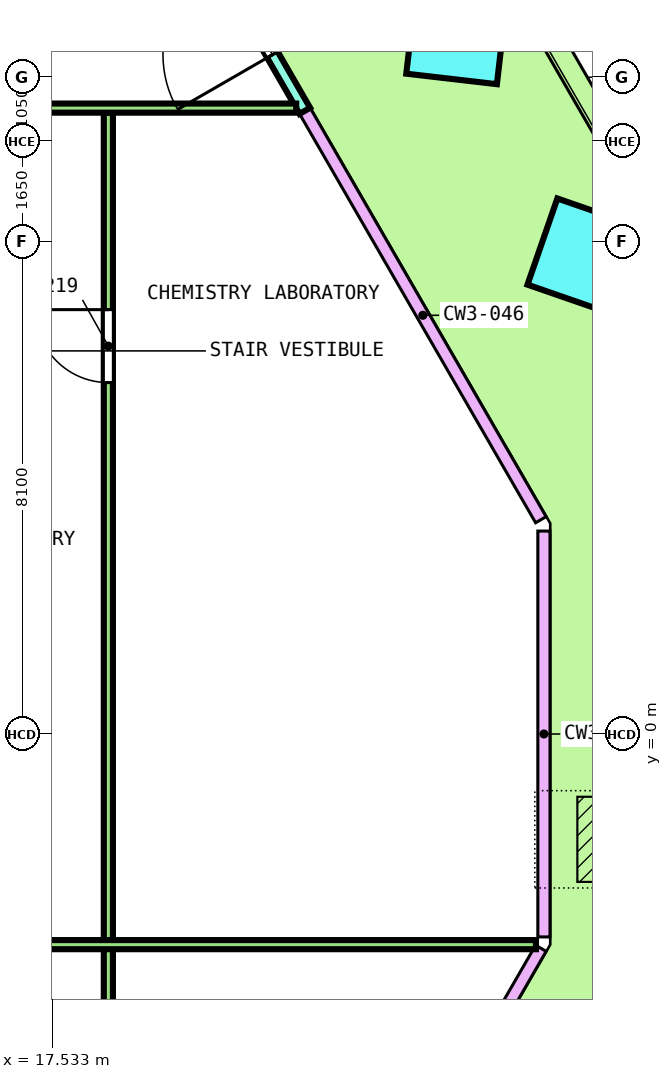
"""IFC4 building model, lengths in metres.
Left out: names, types, materials, properties, quantities, classifications, styles, units other than length and angle.
Written with IfcOpenShell. Run it as: python <this file> out.ifc"""

import sys

from ifc_helpers import new_model, si_unit, direction, frame, frame_2d, origin, origin_2d, place, context, subcontext, project, spatial, rectangle, extrude, element, fill, save


model = new_model("IFC4")
c1 = context("Model", 3, precision=1e-05, world=origin(), true_north=direction((0.0, 1.0)))
c2 = subcontext(c1, "Body", "Model", "MODEL_VIEW")
j1 = project(units=[si_unit("LENGTHUNIT", "METRE"), si_unit("PLANEANGLEUNIT", "RADIAN")], contexts=[c1])
p1 = place(None, origin())
s1 = spatial("IfcSite", under=j1, at=p1, CompositionType="ELEMENT")
p2 = place(p1, origin())
s2 = spatial("IfcBuilding", under=s1, at=p2, CompositionType="ELEMENT")
p3 = place(p2, frame((0.0, 0.0, 14.6)))
s3 = spatial("IfcBuildingStorey", under=s2, at=p3, CompositionType="ELEMENT", Elevation=14.6)
p4 = place(p3, frame((26.297, 7.853, 0.0), z_axis=(0.021750699922, 0.025124769716, 0.999447673968), x_axis=(-0.500115634806, 0.865890237028, -0.010883438912)))
e1 = element("IfcColumn", 1, at=p4, inside=s3, PredefinedType="COLUMN", context=c2, shape_type="SweptSolid", body=[
    extrude(rectangle(XDim=1.5, YDim=1.5, at=origin_2d()), origin(), (0.0, 0.0, 1.0), 4.052),
])
p5 = place(p3, frame((24.181, 11.518, 0.0), z_axis=(0.025367110012, 0.018859632859, 0.999500287133), x_axis=(-0.500321532448, 0.865832038602, -0.003639381657)))
e2 = element("IfcColumn", 2, at=p5, inside=s3, PredefinedType="COLUMN", context=c2, shape_type="SweptSolid", body=[
    extrude(rectangle(XDim=1.5, YDim=1.5, at=origin_2d()), origin(), (0.0, 0.0, 1.0), 4.052),
])
p6 = place(p3, frame((21.681, 10.248, 0.0), z_axis=(0.0, 0.0, 1.0), x_axis=(-0.499985832843, 0.866033583042, 0.0)))
e3 = element("IfcWall", 3, at=p6, inside=s3, PredefinedType="SOLIDWALL", context=c2, shape_type="SweptSolid", body=[
    extrude(rectangle(XDim=3.932, YDim=0.2, at=frame_2d((1.966, 0.0))), origin(), (0.0, 0.0, 1.0), 4.1),
])
p7 = place(p6, frame((1.066, 0.0, 0.0)))
e4 = element("IfcOpeningElement", 4, at=p7, cuts=e3, PredefinedType="OPENING", context=c2, shape_type="SweptSolid", body=[
    extrude(rectangle(XDim=1.8, YDim=2.4, at=frame_2d((0.9, 1.2))), frame((0.0, 0.11, 0.0), z_axis=(0.0, -1.0, 0.0), x_axis=(1.0, 0.0, 0.0)), (0.0, 0.0, 1.0), 0.22),
])
p8 = place(p6, frame((1.066, 0.0, 2.55)))
e5 = element("IfcOpeningElement", 5, at=p8, cuts=e3, PredefinedType="OPENING", context=c2, shape_type="SweptSolid", body=[
    extrude(rectangle(XDim=1.8, YDim=0.45, at=frame_2d((0.9, 0.225))), frame((0.0, 0.11, 0.0), z_axis=(0.0, -1.0, 0.0), x_axis=(1.0, 0.0, 0.0)), (0.0, 0.0, 1.0), 0.22),
])
p9 = place(p3, frame((18.45, -13.428, 0.0), z_axis=(0.0, 0.0, 1.0), x_axis=(0.0, 1.0, 0.0)))
e6 = element("IfcWall", 6, at=p9, inside=s3, PredefinedType="PARTITIONING", context=c2, shape_type="SweptSolid", body=[
    extrude(rectangle(XDim=23.646, YDim=0.15, at=frame_2d((11.823, 0.0))), origin(), (0.0, 0.0, 1.0), 3.05),
])
p10 = place(p9, frame((19.207, 0.0, 0.0)))
e7 = element("IfcOpeningElement", 7, at=p10, cuts=e6, PredefinedType="OPENING", context=c2, shape_type="SweptSolid", body=[
    extrude(rectangle(XDim=1.2, YDim=2.1, at=frame_2d((0.6, 1.05))), frame((0.0, 0.085, 0.0), z_axis=(0.0, -1.0, 0.0), x_axis=(1.0, 0.0, 0.0)), (0.0, 0.0, 1.0), 0.17),
])
p11 = place(p9, frame((5.565, 0.0, 0.0)))
e8 = element("IfcOpeningElement", 8, at=p11, cuts=e6, PredefinedType="OPENING", context=c2, shape_type="SweptSolid", body=[
    extrude(rectangle(XDim=1.2, YDim=2.1, at=frame_2d((0.6, 1.05))), frame((0.0, 0.085, 0.0), z_axis=(0.0, -1.0, 0.0), x_axis=(1.0, 0.0, 0.0)), (0.0, 0.0, 1.0), 0.17),
])
p12 = place(p3, frame((15.525, 10.293, 0.0), z_axis=(0.0, 0.0, 1.0), x_axis=(1.0, 0.0, 0.0)))
e9 = element("IfcWall", 9, at=p12, inside=s3, PredefinedType="PARTITIONING", context=c2, shape_type="SweptSolid", body=[
    extrude(rectangle(XDim=6.014, YDim=0.15, at=frame_2d((3.007, 0.0))), origin(), (0.0, 0.0, 1.0), 3.05),
])
p13 = place(p3, frame((15.525, -3.464, 0.0), z_axis=(0.0, 0.0, 1.0), x_axis=(1.0, 0.0, 0.0)))
e10 = element("IfcWall", 10, at=p13, inside=s3, PredefinedType="PARTITIONING", context=c2, shape_type="SweptSolid", body=[
    extrude(rectangle(XDim=9.957, YDim=0.15, at=frame_2d((4.979, 0.0))), origin(), (0.0, 0.0, 1.0), 3.05),
])
p14 = place(p7, origin())
e11 = element("IfcDoor", 11, at=p14, inside=s3, OperationType="DOUBLE_DOOR_SINGLE_SWING", PredefinedType="DOOR", context=c2, shape_type="SweptSolid", body=[
    extrude(rectangle(XDim=1.8, YDim=2.4, at=frame_2d((0.9, 1.2))), frame((0.0, 0.025, 0.0), z_axis=(0.0, -1.0, 0.0), x_axis=(1.0, 0.0, 0.0)), (0.0, 0.0, 1.0), 0.05),
])
fill(e4, e11)
p15 = place(p8, origin())
e12 = element("IfcWindow", 12, at=p15, inside=s3, PartitioningType="SINGLE_PANEL", PredefinedType="WINDOW", context=c2, shape_type="SweptSolid", body=[
    extrude(rectangle(XDim=1.8, YDim=0.45, at=frame_2d((0.9, 0.225))), frame((0.0, 0.03, 0.0), z_axis=(0.0, -1.0, 0.0), x_axis=(1.0, 0.0, 0.0)), (0.0, 0.0, 1.0), 0.06),
])
fill(e5, e12)
p16 = place(p10, origin())
e13 = element("IfcDoor", 13, at=p16, inside=s3, OperationType="DOUBLE_DOOR_SINGLE_SWING", PredefinedType="DOOR", context=c2, shape_type="SweptSolid", body=[
    extrude(rectangle(XDim=1.2, YDim=2.1, at=frame_2d((0.6, 1.05))), frame((0.0, 0.025, 0.0), z_axis=(0.0, -1.0, 0.0), x_axis=(1.0, 0.0, 0.0)), (0.0, 0.0, 1.0), 0.05),
])
fill(e7, e13)
save(model, sys.argv[1])
